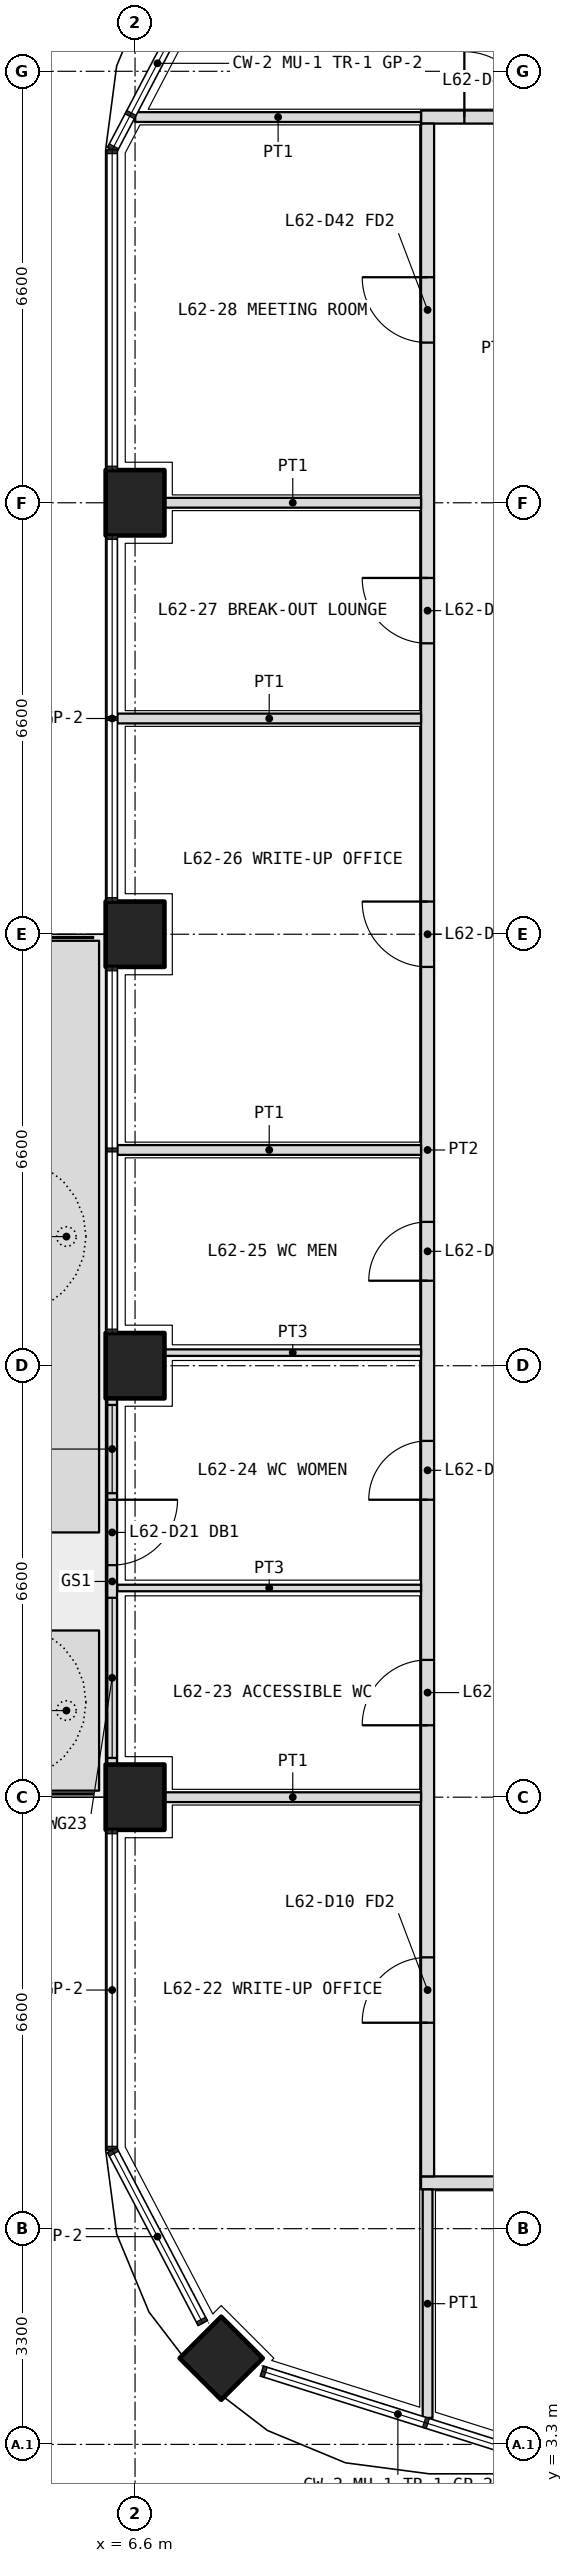
"""IFC4 building model, lengths in metres.
Left out: names, types, materials, properties, quantities, classifications, styles, units other than length and angle.
Written with IfcOpenShell. Run it as: python <this file> out.ifc"""

import sys

from ifc_helpers import new_model, si_unit, direction, frame, frame_2d, origin, origin_2d, place, context, subcontext, project, spatial, polyline, rectangle, outline, extrude, element, fill, save


model = new_model("IFC4")
c1 = context("Model", 3, precision=1e-05, world=origin(), true_north=direction((0.0, 1.0)))
c2 = subcontext(c1, "Body", "Model", "MODEL_VIEW")
j1 = project(units=[si_unit("LENGTHUNIT", "METRE"), si_unit("PLANEANGLEUNIT", "RADIAN")], contexts=[c1])
p1 = place(None, origin())
s1 = spatial("IfcSite", under=j1, at=p1, CompositionType="ELEMENT")
p2 = place(p1, origin())
s2 = spatial("IfcBuilding", under=s1, at=p2, CompositionType="ELEMENT")
p3 = place(p2, frame((0.0, 0.0, 271.2)))
s3 = spatial("IfcBuildingStorey", under=s2, at=p3, CompositionType="ELEMENT", Elevation=271.2)
p4 = place(p3, frame((7.918, 4.618, 0.0), z_axis=(0.0, 0.0, 1.0), x_axis=(0.707106781187, 0.707106781187, 0.0)))
e1 = element("IfcColumn", 1, at=p4, inside=s3, PredefinedType="COLUMN", context=c2, shape_type="SweptSolid", body=[
    extrude(rectangle(XDim=0.9, YDim=0.9, at=origin_2d()), origin(), (0.0, 0.0, 1.0), 4.2),
])
for number, where, z_axis, x_axis in (
    (2, (6.6, 13.2, 0.0), (0.0, 0.0, 1.0), (0.0, 1.0, 0.0)),
    (3, (6.6, 19.8, 0.0), (0.0, 0.0, 1.0), (0.0, 1.0, 0.0)),
    (4, (6.6, 26.4, 0.0), (0.0, 0.0, 1.0), (0.0, 1.0, 0.0)),
    (5, (6.6, 33.0, 0.0), (0.0, 0.0, 1.0), (0.0, 1.0, 0.0)),
):
    element("IfcColumn", number, at=place(p3, frame(where, z_axis=z_axis, x_axis=x_axis)), inside=s3, PredefinedType="COLUMN", context=c2, shape_type="SweptSolid", body=[
        extrude(rectangle(XDim=1.0, YDim=0.9, at=origin_2d()), origin(), (0.0, 0.0, 1.0), 4.2),
    ])
p5 = place(p3, origin())
e6 = element("IfcWall", 6, at=p5, inside=s3, PredefinedType="USERDEFINED", context=c2, shape_type="SweptSolid", body=[
    extrude(outline(polyline([(5.05, 13.3), (6.05, 13.3), (6.05, 15.75), (5.05, 15.75), (5.05, 13.3)]), holes=[polyline([(5.2, 13.45), (5.9, 13.45), (5.9, 15.6), (5.2, 15.6), (5.2, 13.45)])]), origin(), (0.0, 0.0, 1.0), 1.05),
])
p6 = place(p3, origin())
e7 = element("IfcWall", 7, at=p6, inside=s3, PredefinedType="USERDEFINED", context=c2, shape_type="SweptSolid", body=[
    extrude(outline(polyline([(5.05, 17.25), (6.05, 17.25), (6.05, 26.3), (5.05, 26.3), (5.05, 17.25)]), holes=[polyline([(5.2, 17.4), (5.9, 17.4), (5.9, 26.15), (5.2, 26.15), (5.2, 17.4)])]), origin(), (0.0, 0.0, 1.0), 1.05),
])
p7 = place(p3, frame((6.25, 19.3, 0.0), z_axis=(0.0, 0.0, 1.0), x_axis=(0.0, -1.0, 0.0)))
e8 = element("IfcWall", 8, at=p7, inside=s3, PredefinedType="SOLIDWALL", context=c2, shape_type="SweptSolid", body=[
    extrude(rectangle(XDim=5.6, YDim=0.15, at=frame_2d((2.8, 0.0))), origin(), (0.0, 0.0, 1.0), 2.7),
])
p8 = place(p7, frame((1.55, 0.0, 0.0)))
e9 = element("IfcOpeningElement", 9, at=p8, cuts=e8, PredefinedType="OPENING", context=c2, shape_type="SweptSolid", body=[
    extrude(rectangle(XDim=1.0, YDim=2.4, at=frame_2d((0.5, 1.2))), frame((0.0, 0.085, 0.0), z_axis=(0.0, -1.0, 0.0), x_axis=(1.0, 0.0, 0.0)), (0.0, 0.0, 1.0), 0.17),
])
p9 = place(p7, frame((0.1, 0.0, 0.1)))
e10 = element("IfcOpeningElement", 10, at=p9, cuts=e8, PredefinedType="OPENING", context=c2, shape_type="SweptSolid", body=[
    extrude(rectangle(XDim=1.35, YDim=2.3, at=frame_2d((0.675, 1.15))), frame((0.0, 0.085, 0.0), z_axis=(0.0, -1.0, 0.0), x_axis=(1.0, 0.0, 0.0)), (0.0, 0.0, 1.0), 0.17),
])
p10 = place(p7, frame((3.05, 0.0, 0.1)))
e11 = element("IfcOpeningElement", 11, at=p10, cuts=e8, PredefinedType="OPENING", context=c2, shape_type="SweptSolid", body=[
    extrude(rectangle(XDim=2.45, YDim=2.3, at=frame_2d((1.225, 1.15))), frame((0.0, 0.085, 0.0), z_axis=(0.0, -1.0, 0.0), x_axis=(1.0, 0.0, 0.0)), (0.0, 0.0, 1.0), 0.17),
])
p11 = place(p3, frame((10.975, 7.3, 0.0), z_axis=(0.0, 0.0, 1.0), x_axis=(1.0, 0.0, 0.0)))
e12 = element("IfcWall", 12, at=p11, inside=s3, PredefinedType="PARTITIONING", context=c2, shape_type="SweptSolid", body=[
    extrude(rectangle(XDim=30.85, YDim=0.2, at=frame_2d((15.425, 0.0))), origin(), (0.0, 0.0, 1.0), 3.0),
])
p12 = place(p11, frame((7.262, 0.0, 0.0)))
e13 = element("IfcOpeningElement", 13, at=p12, cuts=e12, PredefinedType="OPENING", context=c2, shape_type="SweptSolid", body=[
    extrude(rectangle(XDim=1.0, YDim=2.1, at=frame_2d((0.5, 1.05))), frame((0.0, 0.11, 0.0), z_axis=(0.0, -1.0, 0.0), x_axis=(1.0, 0.0, 0.0)), (0.0, 0.0, 1.0), 0.22),
])
p13 = place(p11, frame((17.025, 0.0, 0.0)))
e14 = element("IfcOpeningElement", 14, at=p13, cuts=e12, PredefinedType="OPENING", context=c2, shape_type="SweptSolid", body=[
    extrude(rectangle(XDim=1.0, YDim=2.1, at=frame_2d((0.5, 1.05))), frame((0.0, 0.11, 0.0), z_axis=(0.0, -1.0, 0.0), x_axis=(1.0, 0.0, 0.0)), (0.0, 0.0, 1.0), 0.22),
])
p14 = place(p11, frame((20.325, 0.0, 0.0)))
e15 = element("IfcOpeningElement", 15, at=p14, cuts=e12, PredefinedType="OPENING", context=c2, shape_type="SweptSolid", body=[
    extrude(rectangle(XDim=1.0, YDim=2.1, at=frame_2d((0.5, 1.05))), frame((0.0, 0.11, 0.0), z_axis=(0.0, -1.0, 0.0), x_axis=(1.0, 0.0, 0.0)), (0.0, 0.0, 1.0), 0.22),
])
p15 = place(p11, frame((25.887, 0.0, 0.0)))
e16 = element("IfcOpeningElement", 16, at=p15, cuts=e12, PredefinedType="OPENING", context=c2, shape_type="SweptSolid", body=[
    extrude(rectangle(XDim=1.0, YDim=2.1, at=frame_2d((0.5, 1.05))), frame((0.0, 0.11, 0.0), z_axis=(0.0, -1.0, 0.0), x_axis=(1.0, 0.0, 0.0)), (0.0, 0.0, 1.0), 0.22),
])
p16 = place(p3, frame((10.975, 38.9, 0.0), z_axis=(0.0, 0.0, 1.0), x_axis=(1.0, 0.0, 0.0)))
e17 = element("IfcWall", 17, at=p16, inside=s3, PredefinedType="PARTITIONING", context=c2, shape_type="SweptSolid", body=[
    extrude(rectangle(XDim=30.85, YDim=0.2, at=frame_2d((15.425, 0.0))), origin(), (0.0, 0.0, 1.0), 3.0),
])
p17 = place(p16, frame((0.663, 0.0, 0.0)))
e18 = element("IfcOpeningElement", 18, at=p17, cuts=e17, PredefinedType="OPENING", context=c2, shape_type="SweptSolid", body=[
    extrude(rectangle(XDim=1.0, YDim=2.1, at=frame_2d((0.5, 1.05))), frame((0.0, 0.11, 0.0), z_axis=(0.0, -1.0, 0.0), x_axis=(1.0, 0.0, 0.0)), (0.0, 0.0, 1.0), 0.22),
])
p18 = place(p16, frame((3.375, 0.0, 0.0)))
e19 = element("IfcOpeningElement", 19, at=p18, cuts=e17, PredefinedType="OPENING", context=c2, shape_type="SweptSolid", body=[
    extrude(rectangle(XDim=1.0, YDim=2.1, at=frame_2d((0.5, 1.05))), frame((0.0, 0.11, 0.0), z_axis=(0.0, -1.0, 0.0), x_axis=(1.0, 0.0, 0.0)), (0.0, 0.0, 1.0), 0.22),
])
p19 = place(p16, frame((8.325, 0.0, 0.0)))
e20 = element("IfcOpeningElement", 20, at=p19, cuts=e17, PredefinedType="OPENING", context=c2, shape_type="SweptSolid", body=[
    extrude(rectangle(XDim=1.0, YDim=2.1, at=frame_2d((0.5, 1.05))), frame((0.0, 0.11, 0.0), z_axis=(0.0, -1.0, 0.0), x_axis=(1.0, 0.0, 0.0)), (0.0, 0.0, 1.0), 0.22),
])
p20 = place(p16, frame((13.275, 0.0, 0.0)))
e21 = element("IfcOpeningElement", 21, at=p20, cuts=e17, PredefinedType="OPENING", context=c2, shape_type="SweptSolid", body=[
    extrude(rectangle(XDim=1.0, YDim=2.1, at=frame_2d((0.5, 1.05))), frame((0.0, 0.11, 0.0), z_axis=(0.0, -1.0, 0.0), x_axis=(1.0, 0.0, 0.0)), (0.0, 0.0, 1.0), 0.22),
])
p21 = place(p16, frame((22.587, 0.0, 0.0)))
e22 = element("IfcOpeningElement", 22, at=p21, cuts=e17, PredefinedType="OPENING", context=c2, shape_type="SweptSolid", body=[
    extrude(rectangle(XDim=1.0, YDim=2.1, at=frame_2d((0.5, 1.05))), frame((0.0, 0.11, 0.0), z_axis=(0.0, -1.0, 0.0), x_axis=(1.0, 0.0, 0.0)), (0.0, 0.0, 1.0), 0.22),
])
p22 = place(p3, frame((11.075, 7.4, 0.0), z_axis=(0.0, 0.0, 1.0), x_axis=(0.0, 1.0, 0.0)))
e23 = element("IfcWall", 23, at=p22, inside=s3, PredefinedType="PARTITIONING", context=c2, shape_type="SweptSolid", body=[
    extrude(rectangle(XDim=31.4, YDim=0.2, at=frame_2d((15.7, 0.0))), origin(), (0.0, 0.0, 1.0), 3.0),
])
p23 = place(p22, frame((2.35, 0.0, 0.0)))
e24 = element("IfcOpeningElement", 24, at=p23, cuts=e23, PredefinedType="OPENING", context=c2, shape_type="SweptSolid", body=[
    extrude(rectangle(XDim=1.0, YDim=2.1, at=frame_2d((0.5, 1.05))), frame((0.0, 0.11, 0.0), z_axis=(0.0, -1.0, 0.0), x_axis=(1.0, 0.0, 0.0)), (0.0, 0.0, 1.0), 0.22),
])
p24 = place(p22, frame((6.9, 0.0, 0.0)))
e25 = element("IfcOpeningElement", 25, at=p24, cuts=e23, PredefinedType="OPENING", context=c2, shape_type="SweptSolid", body=[
    extrude(rectangle(XDim=1.0, YDim=2.1, at=frame_2d((0.5, 1.05))), frame((0.0, 0.11, 0.0), z_axis=(0.0, -1.0, 0.0), x_axis=(1.0, 0.0, 0.0)), (0.0, 0.0, 1.0), 0.22),
])
p25 = place(p22, frame((10.35, 0.0, 0.0)))
e26 = element("IfcOpeningElement", 26, at=p25, cuts=e23, PredefinedType="OPENING", context=c2, shape_type="SweptSolid", body=[
    extrude(rectangle(XDim=0.9, YDim=2.1, at=frame_2d((0.45, 1.05))), frame((0.0, 0.11, 0.0), z_axis=(0.0, -1.0, 0.0), x_axis=(1.0, 0.0, 0.0)), (0.0, 0.0, 1.0), 0.22),
])
p26 = place(p22, frame((13.7, 0.0, 0.0)))
e27 = element("IfcOpeningElement", 27, at=p26, cuts=e23, PredefinedType="OPENING", context=c2, shape_type="SweptSolid", body=[
    extrude(rectangle(XDim=0.9, YDim=2.1, at=frame_2d((0.45, 1.05))), frame((0.0, 0.11, 0.0), z_axis=(0.0, -1.0, 0.0), x_axis=(1.0, 0.0, 0.0)), (0.0, 0.0, 1.0), 0.22),
])
p27 = place(p22, frame((18.5, 0.0, 0.0)))
e28 = element("IfcOpeningElement", 28, at=p27, cuts=e23, PredefinedType="OPENING", context=c2, shape_type="SweptSolid", body=[
    extrude(rectangle(XDim=1.0, YDim=2.1, at=frame_2d((0.5, 1.05))), frame((0.0, 0.11, 0.0), z_axis=(0.0, -1.0, 0.0), x_axis=(1.0, 0.0, 0.0)), (0.0, 0.0, 1.0), 0.22),
])
p28 = place(p22, frame((23.45, 0.0, 0.0)))
e29 = element("IfcOpeningElement", 29, at=p28, cuts=e23, PredefinedType="OPENING", context=c2, shape_type="SweptSolid", body=[
    extrude(rectangle(XDim=1.0, YDim=2.1, at=frame_2d((0.5, 1.05))), frame((0.0, 0.11, 0.0), z_axis=(0.0, -1.0, 0.0), x_axis=(1.0, 0.0, 0.0)), (0.0, 0.0, 1.0), 0.22),
])
p29 = place(p22, frame((28.05, 0.0, 0.0)))
e30 = element("IfcOpeningElement", 30, at=p29, cuts=e23, PredefinedType="OPENING", context=c2, shape_type="SweptSolid", body=[
    extrude(rectangle(XDim=1.0, YDim=2.1, at=frame_2d((0.5, 1.05))), frame((0.0, 0.11, 0.0), z_axis=(0.0, -1.0, 0.0), x_axis=(1.0, 0.0, 0.0)), (0.0, 0.0, 1.0), 0.22),
])
p30 = place(p3, frame((11.075, 3.705, 0.0), z_axis=(0.0, 0.0, 1.0), x_axis=(0.0, 1.0, 0.0)))
e31 = element("IfcWall", 31, at=p30, inside=s3, PredefinedType="PARTITIONING", context=c2, shape_type="SweptSolid", body=[
    extrude(rectangle(XDim=3.495, YDim=0.15, at=frame_2d((1.748, 0.0))), origin(), (0.0, 0.0, 1.0), 2.7),
])
p31 = place(p3, frame((6.603, 38.9, 0.0), z_axis=(0.0, 0.0, 1.0), x_axis=(1.0, 0.0, 0.0)))
e32 = element("IfcWall", 32, at=p31, inside=s3, PredefinedType="PARTITIONING", context=c2, shape_type="SweptSolid", body=[
    extrude(rectangle(XDim=4.373, YDim=0.15, at=frame_2d((2.186, 0.0))), origin(), (0.0, 0.0, 1.0), 2.7),
])
p32 = place(p3, frame((6.33, 16.4, 0.0), z_axis=(0.0, 0.0, 1.0), x_axis=(1.0, 0.0, 0.0)))
e33 = element("IfcWall", 33, at=p32, inside=s3, PredefinedType="PARTITIONING", context=c2, shape_type="SweptSolid", body=[
    extrude(rectangle(XDim=4.645, YDim=0.1, at=frame_2d((2.323, 0.0))), origin(), (0.0, 0.0, 1.0), 2.7),
])
p33 = place(p3, frame((7.05, 20.0, 0.0), z_axis=(0.0, 0.0, 1.0), x_axis=(1.0, 0.0, 0.0)))
e34 = element("IfcWall", 34, at=p33, inside=s3, PredefinedType="PARTITIONING", context=c2, shape_type="SweptSolid", body=[
    extrude(rectangle(XDim=3.925, YDim=0.1, at=frame_2d((1.962, 0.0))), origin(), (0.0, 0.0, 1.0), 3.0),
])
p34 = place(p3, frame((6.33, 23.1, 0.0), z_axis=(0.0, 0.0, 1.0), x_axis=(1.0, 0.0, 0.0)))
e35 = element("IfcWall", 35, at=p34, inside=s3, PredefinedType="PARTITIONING", context=c2, shape_type="SweptSolid", body=[
    extrude(rectangle(XDim=4.645, YDim=0.15, at=frame_2d((2.323, 0.0))), origin(), (0.0, 0.0, 1.0), 2.7),
])
p35 = place(p3, frame((7.05, 13.2, 0.0), z_axis=(0.0, 0.0, 1.0), x_axis=(1.0, 0.0, 0.0)))
e36 = element("IfcWall", 36, at=p35, inside=s3, PredefinedType="PARTITIONING", context=c2, shape_type="SweptSolid", body=[
    extrude(rectangle(XDim=3.925, YDim=0.15, at=frame_2d((1.962, 0.0))), origin(), (0.0, 0.0, 1.0), 3.0),
])
p36 = place(p3, frame((6.33, 29.7, 0.0), z_axis=(0.0, 0.0, 1.0), x_axis=(1.0, 0.0, 0.0)))
e37 = element("IfcWall", 37, at=p36, inside=s3, PredefinedType="PARTITIONING", context=c2, shape_type="SweptSolid", body=[
    extrude(rectangle(XDim=4.645, YDim=0.15, at=frame_2d((2.323, 0.0))), origin(), (0.0, 0.0, 1.0), 2.7),
])
p37 = place(p3, frame((7.05, 33.0, 0.0), z_axis=(0.0, 0.0, 1.0), x_axis=(1.0, 0.0, 0.0)))
e38 = element("IfcWall", 38, at=p37, inside=s3, PredefinedType="PARTITIONING", context=c2, shape_type="SweptSolid", body=[
    extrude(rectangle(XDim=3.925, YDim=0.15, at=frame_2d((1.962, 0.0))), origin(), (0.0, 0.0, 1.0), 3.0),
])
p38 = place(p8, origin())
e39 = element("IfcDoor", 39, at=p38, inside=s3, OperationType="SINGLE_SWING_LEFT", PredefinedType="DOOR", context=c2, shape_type="SweptSolid", body=[
    extrude(rectangle(XDim=1.0, YDim=2.4, at=frame_2d((0.5, 1.2))), frame((0.0, 0.025, 0.0), z_axis=(0.0, -1.0, 0.0), x_axis=(1.0, 0.0, 0.0)), (0.0, 0.0, 1.0), 0.05),
])
fill(e9, e39)
p39 = place(p9, origin())
e40 = element("IfcWindow", 40, at=p39, inside=s3, PartitioningType="SINGLE_PANEL", PredefinedType="WINDOW", context=c2, shape_type="SweptSolid", body=[
    extrude(rectangle(XDim=1.35, YDim=2.3, at=frame_2d((0.675, 1.15))), frame((0.0, 0.03, 0.0), z_axis=(0.0, -1.0, 0.0), x_axis=(1.0, 0.0, 0.0)), (0.0, 0.0, 1.0), 0.06),
])
fill(e10, e40)
p40 = place(p10, origin())
e41 = element("IfcWindow", 41, at=p40, inside=s3, PartitioningType="SINGLE_PANEL", PredefinedType="WINDOW", context=c2, shape_type="SweptSolid", body=[
    extrude(rectangle(XDim=2.45, YDim=2.3, at=frame_2d((1.225, 1.15))), frame((0.0, 0.03, 0.0), z_axis=(0.0, -1.0, 0.0), x_axis=(1.0, 0.0, 0.0)), (0.0, 0.0, 1.0), 0.06),
])
fill(e11, e41)
p41 = place(p17, origin())
e42 = element("IfcDoor", 42, at=p41, inside=s3, OperationType="SINGLE_SWING_LEFT", PredefinedType="DOOR", context=c2, shape_type="SweptSolid", body=[
    extrude(rectangle(XDim=1.0, YDim=2.1, at=frame_2d((0.5, 1.05))), frame((0.0, 0.025, 0.0), z_axis=(0.0, -1.0, 0.0), x_axis=(1.0, 0.0, 0.0)), (0.0, 0.0, 1.0), 0.05),
])
fill(e18, e42)
p42 = place(p23, origin())
e43 = element("IfcDoor", 43, at=p42, inside=s3, OperationType="SINGLE_SWING_LEFT", PredefinedType="DOOR", context=c2, shape_type="SweptSolid", body=[
    extrude(rectangle(XDim=1.0, YDim=2.1, at=frame_2d((0.5, 1.05))), frame((0.0, 0.025, 0.0), z_axis=(0.0, -1.0, 0.0), x_axis=(1.0, 0.0, 0.0)), (0.0, 0.0, 1.0), 0.05),
])
fill(e24, e43)
p43 = place(p24, origin())
e44 = element("IfcDoor", 44, at=p43, inside=s3, OperationType="SINGLE_SWING_LEFT", PredefinedType="DOOR", context=c2, shape_type="SweptSolid", body=[
    extrude(rectangle(XDim=1.0, YDim=2.1, at=frame_2d((0.5, 1.05))), frame((0.0, 0.025, 0.0), z_axis=(0.0, -1.0, 0.0), x_axis=(1.0, 0.0, 0.0)), (0.0, 0.0, 1.0), 0.05),
])
fill(e25, e44)
p44 = place(p25, origin())
e45 = element("IfcDoor", 45, at=p44, inside=s3, OperationType="SINGLE_SWING_LEFT", PredefinedType="DOOR", context=c2, shape_type="SweptSolid", body=[
    extrude(rectangle(XDim=0.9, YDim=2.1, at=frame_2d((0.45, 1.05))), frame((0.0, 0.025, 0.0), z_axis=(0.0, -1.0, 0.0), x_axis=(1.0, 0.0, 0.0)), (0.0, 0.0, 1.0), 0.05),
])
fill(e26, e45)
p45 = place(p26, origin())
e46 = element("IfcDoor", 46, at=p45, inside=s3, OperationType="SINGLE_SWING_LEFT", PredefinedType="DOOR", context=c2, shape_type="SweptSolid", body=[
    extrude(rectangle(XDim=0.9, YDim=2.1, at=frame_2d((0.45, 1.05))), frame((0.0, 0.025, 0.0), z_axis=(0.0, -1.0, 0.0), x_axis=(1.0, 0.0, 0.0)), (0.0, 0.0, 1.0), 0.05),
])
fill(e27, e46)
p46 = place(p27, origin())
e47 = element("IfcDoor", 47, at=p46, inside=s3, OperationType="SINGLE_SWING_RIGHT", PredefinedType="DOOR", context=c2, shape_type="SweptSolid", body=[
    extrude(rectangle(XDim=1.0, YDim=2.1, at=frame_2d((0.5, 1.05))), frame((0.0, 0.025, 0.0), z_axis=(0.0, -1.0, 0.0), x_axis=(1.0, 0.0, 0.0)), (0.0, 0.0, 1.0), 0.05),
])
fill(e28, e47)
p47 = place(p28, origin())
e48 = element("IfcDoor", 48, at=p47, inside=s3, OperationType="SINGLE_SWING_RIGHT", PredefinedType="DOOR", context=c2, shape_type="SweptSolid", body=[
    extrude(rectangle(XDim=1.0, YDim=2.1, at=frame_2d((0.5, 1.05))), frame((0.0, 0.025, 0.0), z_axis=(0.0, -1.0, 0.0), x_axis=(1.0, 0.0, 0.0)), (0.0, 0.0, 1.0), 0.05),
])
fill(e29, e48)
p48 = place(p29, origin())
e49 = element("IfcDoor", 49, at=p48, inside=s3, OperationType="SINGLE_SWING_RIGHT", PredefinedType="DOOR", context=c2, shape_type="SweptSolid", body=[
    extrude(rectangle(XDim=1.0, YDim=2.1, at=frame_2d((0.5, 1.05))), frame((0.0, 0.025, 0.0), z_axis=(0.0, -1.0, 0.0), x_axis=(1.0, 0.0, 0.0)), (0.0, 0.0, 1.0), 0.05),
])
fill(e30, e49)
save(model, sys.argv[1])
